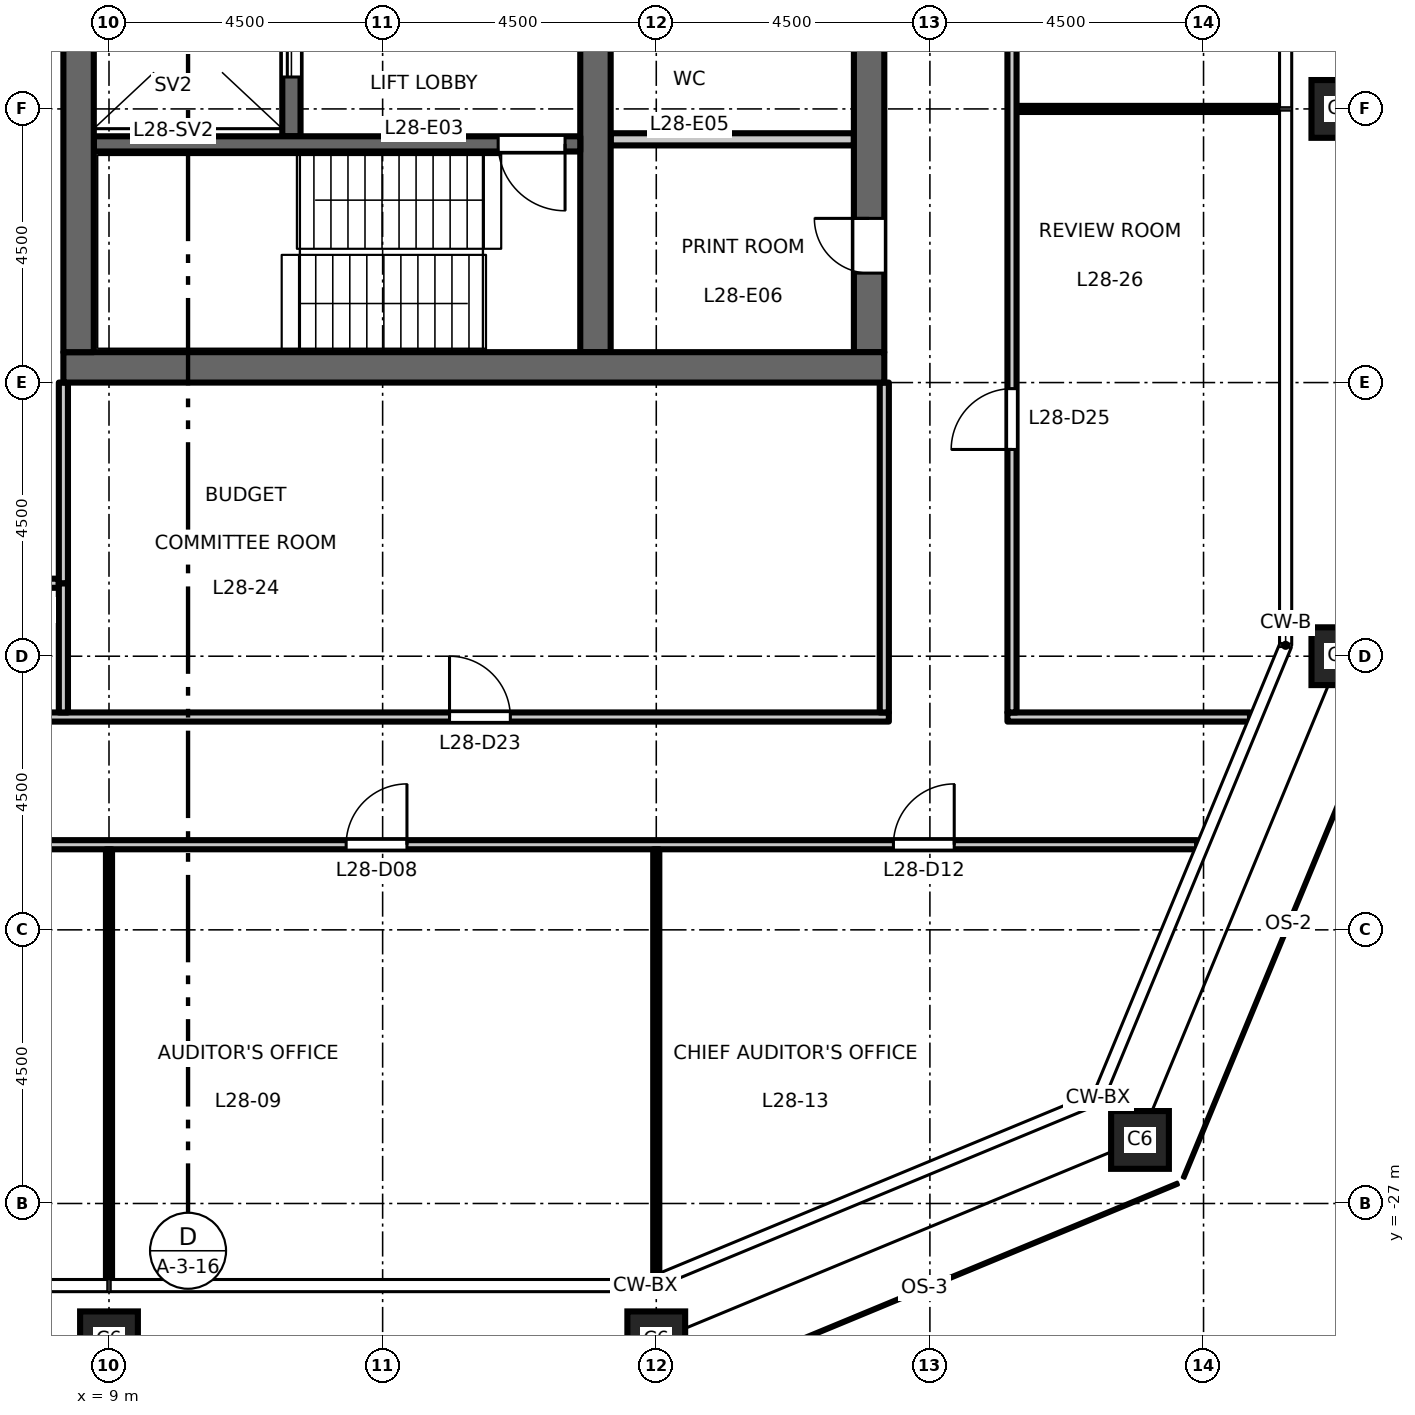
"""IFC4 building model, lengths in metres.
Left out: names, types, materials, properties, quantities, classifications, styles, units other than length and angle.
Written with IfcOpenShell. Run it as: python <this file> out.ifc"""

import sys

from ifc_helpers import new_model, si_unit, direction, frame, frame_2d, origin, origin_2d, place, context, subcontext, project, spatial, rectangle, hollow_rectangle, extrude, element, fill, save


model = new_model("IFC4")
c1 = context("Model", 3, precision=1e-05, world=origin(), true_north=direction((0.0, 1.0)))
c2 = subcontext(c1, "Body", "Model", "MODEL_VIEW")
j1 = project(units=[si_unit("LENGTHUNIT", "METRE"), si_unit("PLANEANGLEUNIT", "RADIAN")], contexts=[c1])
p1 = place(None, origin())
s1 = spatial("IfcSite", under=j1, at=p1, CompositionType="ELEMENT")
p2 = place(p1, origin())
s2 = spatial("IfcBuilding", under=s1, at=p2, CompositionType="ELEMENT")
p3 = place(p2, frame((0.0, 0.0, 131.7)))
s3 = spatial("IfcBuildingStorey", under=s2, at=p3, CompositionType="ELEMENT", Elevation=131.7)
for number, where, z_axis, x_axis in (
    (1, (9.0, -29.25, 0.0), (0.0, 0.0, 1.0), (1.0, 0.0, 0.0)),
    (2, (18.0, -29.25, 0.0), (0.0, 0.0, 1.0), (1.0, 0.0, 0.0)),
    (3, (25.955, -25.955, 0.0), (0.0, 0.0, 1.0), (1.0, 0.0, 0.0)),
    (4, (29.25, -18.0, 0.0), (0.0, 0.0, 1.0), (1.0, 0.0, 0.0)),
    (5, (29.25, -9.0, 0.0), (0.0, 0.0, 1.0), (1.0, 0.0, 0.0)),
):
    element("IfcColumn", number, at=place(p3, frame(where, z_axis=z_axis, x_axis=x_axis)), inside=s3, PredefinedType="COLUMN", context=c2, shape_type="SweptSolid", body=[
        extrude(hollow_rectangle(XDim=0.95, YDim=0.95, WallThickness=0.055, at=origin_2d()), origin(), (0.0, 0.0, 1.0), 4.5),
    ])
p4 = place(p3, frame((12.0, -9.45, 0.0), z_axis=(0.0, 0.0, 1.0), x_axis=(0.0, 1.0, 0.0)))
e6 = element("IfcWall", 6, at=p4, inside=s3, PredefinedType="SHEAR", context=c2, shape_type="SweptSolid", body=[
    extrude(rectangle(XDim=18.9, YDim=0.3, at=frame_2d((9.45, 0.0))), origin(), (0.0, 0.0, 1.0), 4.35),
])
p5 = place(p4, frame((3.625, 0.0, 0.0)))
e7 = element("IfcOpeningElement", 7, at=p5, cuts=e6, PredefinedType="OPENING", context=c2, shape_type="SweptSolid", body=[
    extrude(rectangle(XDim=1.1, YDim=2.1, at=frame_2d((0.55, 1.05))), frame((0.0, 0.16, 0.0), z_axis=(0.0, -1.0, 0.0), x_axis=(1.0, 0.0, 0.0)), (0.0, 0.0, 1.0), 0.32),
])
p6 = place(p4, frame((6.775, 0.0, 0.0)))
e8 = element("IfcOpeningElement", 8, at=p6, cuts=e6, PredefinedType="OPENING", context=c2, shape_type="SweptSolid", body=[
    extrude(rectangle(XDim=1.1, YDim=2.1, at=frame_2d((0.55, 1.05))), frame((0.0, 0.16, 0.0), z_axis=(0.0, -1.0, 0.0), x_axis=(1.0, 0.0, 0.0)), (0.0, 0.0, 1.0), 0.32),
])
p7 = place(p4, frame((9.925, 0.0, 0.0)))
e9 = element("IfcOpeningElement", 9, at=p7, cuts=e6, PredefinedType="OPENING", context=c2, shape_type="SweptSolid", body=[
    extrude(rectangle(XDim=1.1, YDim=2.1, at=frame_2d((0.55, 1.05))), frame((0.0, 0.16, 0.0), z_axis=(0.0, -1.0, 0.0), x_axis=(1.0, 0.0, 0.0)), (0.0, 0.0, 1.0), 0.32),
])
p8 = place(p4, frame((13.075, 0.0, 0.0)))
e10 = element("IfcOpeningElement", 10, at=p8, cuts=e6, PredefinedType="OPENING", context=c2, shape_type="SweptSolid", body=[
    extrude(rectangle(XDim=1.1, YDim=2.1, at=frame_2d((0.55, 1.05))), frame((0.0, 0.16, 0.0), z_axis=(0.0, -1.0, 0.0), x_axis=(1.0, 0.0, 0.0)), (0.0, 0.0, 1.0), 0.32),
])
p9 = place(p4, frame((16.725, 0.0, 0.0)))
e11 = element("IfcOpeningElement", 11, at=p9, cuts=e6, PredefinedType="OPENING", context=c2, shape_type="SweptSolid", body=[
    extrude(rectangle(XDim=1.2, YDim=2.1, at=frame_2d((0.6, 1.05))), frame((0.0, 0.16, 0.0), z_axis=(0.0, -1.0, 0.0), x_axis=(1.0, 0.0, 0.0)), (0.0, 0.0, 1.0), 0.32),
])
p10 = place(p4, frame((0.975, 0.0, 0.0)))
e12 = element("IfcOpeningElement", 12, at=p10, cuts=e6, PredefinedType="OPENING", context=c2, shape_type="SweptSolid", body=[
    extrude(rectangle(XDim=1.2, YDim=2.1, at=frame_2d((0.6, 1.05))), frame((0.0, 0.16, 0.0), z_axis=(0.0, -1.0, 0.0), x_axis=(1.0, 0.0, 0.0)), (0.0, 0.0, 1.0), 0.32),
])
p11 = place(p3, frame((21.5, -13.0, 0.0), z_axis=(0.0, 0.0, 1.0), x_axis=(0.0, 1.0, 0.0)))
e13 = element("IfcWall", 13, at=p11, inside=s3, PredefinedType="SHEAR", context=c2, shape_type="SweptSolid", body=[
    extrude(rectangle(XDim=26.0, YDim=0.5, at=frame_2d((13.0, 0.0))), origin(), (0.0, 0.0, 1.0), 4.35),
])
p12 = place(p11, frame((16.825, 0.0, 0.0)))
e14 = element("IfcOpeningElement", 14, at=p12, cuts=e13, PredefinedType="OPENING", context=c2, shape_type="SweptSolid", body=[
    extrude(rectangle(XDim=1.8, YDim=2.1, at=frame_2d((0.9, 1.05))), frame((0.0, 0.26, 0.0), z_axis=(0.0, -1.0, 0.0), x_axis=(1.0, 0.0, 0.0)), (0.0, 0.0, 1.0), 0.52),
])
p13 = place(p11, frame((7.375, 0.0, 0.0)))
e15 = element("IfcOpeningElement", 15, at=p13, cuts=e13, PredefinedType="OPENING", context=c2, shape_type="SweptSolid", body=[
    extrude(rectangle(XDim=1.8, YDim=2.1, at=frame_2d((0.9, 1.05))), frame((0.0, 0.26, 0.0), z_axis=(0.0, -1.0, 0.0), x_axis=(1.0, 0.0, 0.0)), (0.0, 0.0, 1.0), 0.52),
])
p14 = place(p11, frame((1.3, 0.0, 0.0)))
e16 = element("IfcOpeningElement", 16, at=p14, cuts=e13, PredefinedType="OPENING", context=c2, shape_type="SweptSolid", body=[
    extrude(rectangle(XDim=0.9, YDim=2.1, at=frame_2d((0.45, 1.05))), frame((0.0, 0.26, 0.0), z_axis=(0.0, -1.0, 0.0), x_axis=(1.0, 0.0, 0.0)), (0.0, 0.0, 1.0), 0.52),
])
p15 = place(p3, frame((17.25, -9.5, 0.0), z_axis=(0.0, 0.0, 1.0), x_axis=(1.0, 0.0, 0.0)))
e17 = element("IfcWall", 17, at=p15, inside=s3, PredefinedType="PARTITIONING", context=c2, shape_type="SweptSolid", body=[
    extrude(rectangle(XDim=4.0, YDim=0.2, at=frame_2d((2.0, 0.0))), origin(), (0.0, 0.0, 1.0), 4.35),
])
p16 = place(p3, frame((17.0, -13.0, 0.0), z_axis=(0.0, 0.0, 1.0), x_axis=(0.0, 1.0, 0.0)))
e18 = element("IfcWall", 18, at=p16, inside=s3, PredefinedType="SHEAR", context=c2, shape_type="SweptSolid", body=[
    extrude(rectangle(XDim=6.575, YDim=0.5, at=frame_2d((3.288, 0.0))), origin(), (0.0, 0.0, 1.0), 4.35),
])
p17 = place(p3, frame((8.75, -9.575, 0.0), z_axis=(0.0, 0.0, 1.0), x_axis=(1.0, 0.0, 0.0)))
e19 = element("IfcWall", 19, at=p17, inside=s3, PredefinedType="SHEAR", context=c2, shape_type="SweptSolid", body=[
    extrude(rectangle(XDim=8.0, YDim=0.25, at=frame_2d((4.0, 0.0))), origin(), (0.0, 0.0, 1.0), 4.35),
])
p18 = place(p17, frame((6.65, 0.0, 0.0)))
e20 = element("IfcOpeningElement", 20, at=p18, cuts=e19, PredefinedType="OPENING", context=c2, shape_type="SweptSolid", body=[
    extrude(rectangle(XDim=1.1, YDim=2.1, at=frame_2d((0.55, 1.05))), frame((0.0, 0.135, 0.0), z_axis=(0.0, -1.0, 0.0), x_axis=(1.0, 0.0, 0.0)), (0.0, 0.0, 1.0), 0.27),
])
p19 = place(p3, frame((8.25, -13.25, 0.0), z_axis=(0.0, 0.0, 1.0), x_axis=(1.0, 0.0, 0.0)))
e21 = element("IfcWall", 21, at=p19, inside=s3, PredefinedType="SHEAR", context=c2, shape_type="SweptSolid", body=[
    extrude(rectangle(XDim=13.5, YDim=0.5, at=frame_2d((6.75, 0.0))), origin(), (0.0, 0.0, 1.0), 4.35),
])
p20 = place(p3, frame((8.5, -13.0, 0.0), z_axis=(0.0, 0.0, 1.0), x_axis=(0.0, 1.0, 0.0)))
e22 = element("IfcWall", 22, at=p20, inside=s3, PredefinedType="SHEAR", context=c2, shape_type="SweptSolid", body=[
    extrude(rectangle(XDim=26.0, YDim=0.5, at=frame_2d((13.0, 0.0))), origin(), (0.0, 0.0, 1.0), 4.35),
])
p21 = place(p3, frame((-26.894, -21.1, 0.0), z_axis=(0.0, 0.0, 1.0), x_axis=(1.0, 0.0, 0.0)))
e23 = element("IfcWall", 23, at=p21, inside=s3, PredefinedType="PARTITIONING", context=c2, shape_type="SweptSolid", body=[
    extrude(rectangle(XDim=53.788, YDim=0.15, at=frame_2d((26.894, 0.0))), origin(), (0.0, 0.0, 1.0), 4.35),
])
p22 = place(p21, frame((12.794, 0.0, 0.0)))
e24 = element("IfcOpeningElement", 24, at=p22, cuts=e23, PredefinedType="OPENING", context=c2, shape_type="SweptSolid", body=[
    extrude(rectangle(XDim=1.0, YDim=2.1, at=frame_2d((0.5, 1.05))), frame((0.0, 0.085, 0.0), z_axis=(0.0, -1.0, 0.0), x_axis=(1.0, 0.0, 0.0)), (0.0, 0.0, 1.0), 0.17),
])
p23 = place(p21, frame((21.794, 0.0, 0.0)))
e25 = element("IfcOpeningElement", 25, at=p23, cuts=e23, PredefinedType="OPENING", context=c2, shape_type="SweptSolid", body=[
    extrude(rectangle(XDim=1.0, YDim=2.1, at=frame_2d((0.5, 1.05))), frame((0.0, 0.085, 0.0), z_axis=(0.0, -1.0, 0.0), x_axis=(1.0, 0.0, 0.0)), (0.0, 0.0, 1.0), 0.17),
])
p24 = place(p21, frame((30.794, 0.0, 0.0)))
e26 = element("IfcOpeningElement", 26, at=p24, cuts=e23, PredefinedType="OPENING", context=c2, shape_type="SweptSolid", body=[
    extrude(rectangle(XDim=1.0, YDim=2.1, at=frame_2d((0.5, 1.05))), frame((0.0, 0.085, 0.0), z_axis=(0.0, -1.0, 0.0), x_axis=(1.0, 0.0, 0.0)), (0.0, 0.0, 1.0), 0.17),
])
p25 = place(p21, frame((39.794, 0.0, 0.0)))
e27 = element("IfcOpeningElement", 27, at=p25, cuts=e23, PredefinedType="OPENING", context=c2, shape_type="SweptSolid", body=[
    extrude(rectangle(XDim=1.0, YDim=2.1, at=frame_2d((0.5, 1.05))), frame((0.0, 0.085, 0.0), z_axis=(0.0, -1.0, 0.0), x_axis=(1.0, 0.0, 0.0)), (0.0, 0.0, 1.0), 0.17),
])
p26 = place(p21, frame((3.9, 0.0, 0.0)))
e28 = element("IfcOpeningElement", 28, at=p26, cuts=e23, PredefinedType="OPENING", context=c2, shape_type="SweptSolid", body=[
    extrude(rectangle(XDim=1.0, YDim=2.1, at=frame_2d((0.5, 1.05))), frame((0.0, 0.085, 0.0), z_axis=(0.0, -1.0, 0.0), x_axis=(1.0, 0.0, 0.0)), (0.0, 0.0, 1.0), 0.17),
])
p27 = place(p21, frame((48.794, 0.0, 0.0)))
e29 = element("IfcOpeningElement", 29, at=p27, cuts=e23, PredefinedType="OPENING", context=c2, shape_type="SweptSolid", body=[
    extrude(rectangle(XDim=1.0, YDim=2.1, at=frame_2d((0.5, 1.05))), frame((0.0, 0.085, 0.0), z_axis=(0.0, -1.0, 0.0), x_axis=(1.0, 0.0, 0.0)), (0.0, 0.0, 1.0), 0.17),
])
p28 = place(p3, frame((-21.825, -19.0, 0.0), z_axis=(0.0, 0.0, 1.0), x_axis=(1.0, 0.0, 0.0)))
e30 = element("IfcWall", 30, at=p28, inside=s3, PredefinedType="PARTITIONING", context=c2, shape_type="SweptSolid", body=[
    extrude(rectangle(XDim=43.65, YDim=0.15, at=frame_2d((21.825, 0.0))), origin(), (0.0, 0.0, 1.0), 4.35),
])
p29 = place(p28, frame((21.425, 0.0, 0.0)))
e31 = element("IfcOpeningElement", 31, at=p29, cuts=e30, PredefinedType="OPENING", context=c2, shape_type="SweptSolid", body=[
    extrude(rectangle(XDim=1.0, YDim=2.1, at=frame_2d((0.5, 1.05))), frame((0.0, 0.085, 0.0), z_axis=(0.0, -1.0, 0.0), x_axis=(1.0, 0.0, 0.0)), (0.0, 0.0, 1.0), 0.17),
])
p30 = place(p28, frame((6.425, 0.0, 0.0)))
e32 = element("IfcOpeningElement", 32, at=p30, cuts=e30, PredefinedType="OPENING", context=c2, shape_type="SweptSolid", body=[
    extrude(rectangle(XDim=1.0, YDim=2.1, at=frame_2d((0.5, 1.05))), frame((0.0, 0.085, 0.0), z_axis=(0.0, -1.0, 0.0), x_axis=(1.0, 0.0, 0.0)), (0.0, 0.0, 1.0), 0.17),
])
p31 = place(p28, frame((36.425, 0.0, 0.0)))
e33 = element("IfcOpeningElement", 33, at=p31, cuts=e30, PredefinedType="OPENING", context=c2, shape_type="SweptSolid", body=[
    extrude(rectangle(XDim=1.0, YDim=2.1, at=frame_2d((0.5, 1.05))), frame((0.0, 0.085, 0.0), z_axis=(0.0, -1.0, 0.0), x_axis=(1.0, 0.0, 0.0)), (0.0, 0.0, 1.0), 0.17),
])
p32 = place(p3, frame((23.775, -19.0, 0.0), z_axis=(0.0, 0.0, 1.0), x_axis=(1.0, 0.0, 0.0)))
e34 = element("IfcWall", 34, at=p32, inside=s3, PredefinedType="PARTITIONING", context=c2, shape_type="SweptSolid", body=[
    extrude(rectangle(XDim=3.989, YDim=0.15, at=frame_2d((1.995, 0.0))), origin(), (0.0, 0.0, 1.0), 4.35),
])
p33 = place(p3, frame((6.66, -16.8, 0.0), z_axis=(0.0, 0.0, 1.0), x_axis=(1.0, 0.0, 0.0)))
e35 = element("IfcWall", 35, at=p33, inside=s3, PredefinedType="PARTITIONING", context=c2, shape_type="SweptSolid", body=[
    extrude(rectangle(XDim=1.515, YDim=0.15, at=frame_2d((0.758, 0.0))), origin(), (0.0, 0.0, 1.0), 4.35),
])
p34 = place(p33, frame((0.29, 0.0, 0.0)))
e36 = element("IfcOpeningElement", 36, at=p34, cuts=e35, PredefinedType="OPENING", context=c2, shape_type="SweptSolid", body=[
    extrude(rectangle(XDim=0.9, YDim=2.1, at=frame_2d((0.45, 1.05))), frame((0.0, 0.085, 0.0), z_axis=(0.0, -1.0, 0.0), x_axis=(1.0, 0.0, 0.0)), (0.0, 0.0, 1.0), 0.17),
])
p35 = place(p3, frame((23.925, -9.0, 0.0), z_axis=(0.0, 0.0, 1.0), x_axis=(1.0, 0.0, 0.0)))
e37 = element("IfcWall", 37, at=p35, inside=s3, PredefinedType="PARTITIONING", context=c2, shape_type="SweptSolid", body=[
    extrude(rectangle(XDim=4.335, YDim=0.1, at=frame_2d((2.167, 0.0))), origin(), (0.0, 0.0, 1.0), 4.35),
])
p36 = place(p3, frame((8.25, -18.925, 0.0), z_axis=(0.0, 0.0, 1.0), x_axis=(0.0, 1.0, 0.0)))
e38 = element("IfcWall", 38, at=p36, inside=s3, PredefinedType="PARTITIONING", context=c2, shape_type="SweptSolid", body=[
    extrude(rectangle(XDim=2.125, YDim=0.15, at=frame_2d((1.062, 0.0))), origin(), (0.0, 0.0, 1.0), 4.35),
])
p37 = place(p3, frame((8.25, -16.8, 0.0), z_axis=(0.0, 0.0, 1.0), x_axis=(0.0, 1.0, 0.0)))
e39 = element("IfcWall", 39, at=p37, inside=s3, PredefinedType="PARTITIONING", context=c2, shape_type="SweptSolid", body=[
    extrude(rectangle(XDim=3.3, YDim=0.15, at=frame_2d((1.65, 0.0))), origin(), (0.0, 0.0, 1.0), 4.35),
])
p38 = place(p3, frame((9.0, -28.26, 0.0), z_axis=(0.0, 0.0, 1.0), x_axis=(0.0, 1.0, 0.0)))
e40 = element("IfcWall", 40, at=p38, inside=s3, PredefinedType="PARTITIONING", context=c2, shape_type="SweptSolid", body=[
    extrude(rectangle(XDim=7.085, YDim=0.1, at=frame_2d((3.542, 0.0))), origin(), (0.0, 0.0, 1.0), 3.45),
])
p39 = place(p3, frame((18.0, -28.178, 0.0), z_axis=(0.0, 0.0, 1.0), x_axis=(0.0, 1.0, 0.0)))
e41 = element("IfcWall", 41, at=p39, inside=s3, PredefinedType="PARTITIONING", context=c2, shape_type="SweptSolid", body=[
    extrude(rectangle(XDim=7.003, YDim=0.1, at=frame_2d((3.501, 0.0))), origin(), (0.0, 0.0, 1.0), 3.45),
])
p40 = place(p3, frame((21.75, -18.925, 0.0), z_axis=(0.0, 0.0, 1.0), x_axis=(0.0, 1.0, 0.0)))
e42 = element("IfcWall", 42, at=p40, inside=s3, PredefinedType="PARTITIONING", context=c2, shape_type="SweptSolid", body=[
    extrude(rectangle(XDim=5.425, YDim=0.15, at=frame_2d((2.712, 0.0))), origin(), (0.0, 0.0, 1.0), 4.35),
])
p41 = place(p3, frame((23.85, -18.925, 0.0), z_axis=(0.0, 0.0, 1.0), x_axis=(0.0, 1.0, 0.0)))
e43 = element("IfcWall", 43, at=p41, inside=s3, PredefinedType="PARTITIONING", context=c2, shape_type="SweptSolid", body=[
    extrude(rectangle(XDim=37.85, YDim=0.15, at=frame_2d((18.925, 0.0))), origin(), (0.0, 0.0, 1.0), 4.35),
])
p42 = place(p41, frame((4.325, 0.0, 0.0)))
e44 = element("IfcOpeningElement", 44, at=p42, cuts=e43, PredefinedType="OPENING", context=c2, shape_type="SweptSolid", body=[
    extrude(rectangle(XDim=1.0, YDim=2.1, at=frame_2d((0.5, 1.05))), frame((0.0, 0.085, 0.0), z_axis=(0.0, -1.0, 0.0), x_axis=(1.0, 0.0, 0.0)), (0.0, 0.0, 1.0), 0.17),
])
p43 = place(p41, frame((13.825, 0.0, 0.0)))
e45 = element("IfcOpeningElement", 45, at=p43, cuts=e43, PredefinedType="OPENING", context=c2, shape_type="SweptSolid", body=[
    extrude(rectangle(XDim=1.0, YDim=2.1, at=frame_2d((0.5, 1.05))), frame((0.0, 0.085, 0.0), z_axis=(0.0, -1.0, 0.0), x_axis=(1.0, 0.0, 0.0)), (0.0, 0.0, 1.0), 0.17),
])
p44 = place(p41, frame((22.825, 0.0, 0.0)))
e46 = element("IfcOpeningElement", 46, at=p44, cuts=e43, PredefinedType="OPENING", context=c2, shape_type="SweptSolid", body=[
    extrude(rectangle(XDim=1.0, YDim=2.1, at=frame_2d((0.5, 1.05))), frame((0.0, 0.085, 0.0), z_axis=(0.0, -1.0, 0.0), x_axis=(1.0, 0.0, 0.0)), (0.0, 0.0, 1.0), 0.17),
])
p45 = place(p41, frame((32.325, 0.0, 0.0)))
e47 = element("IfcOpeningElement", 47, at=p45, cuts=e43, PredefinedType="OPENING", context=c2, shape_type="SweptSolid", body=[
    extrude(rectangle(XDim=1.0, YDim=2.1, at=frame_2d((0.5, 1.05))), frame((0.0, 0.085, 0.0), z_axis=(0.0, -1.0, 0.0), x_axis=(1.0, 0.0, 0.0)), (0.0, 0.0, 1.0), 0.17),
])
p46 = place(p18, origin())
e48 = element("IfcDoor", 48, at=p46, inside=s3, OperationType="SINGLE_SWING_RIGHT", PredefinedType="DOOR", context=c2, shape_type="SweptSolid", body=[
    extrude(rectangle(XDim=1.1, YDim=2.1, at=frame_2d((0.55, 1.05))), frame((0.0, 0.025, 0.0), z_axis=(0.0, -1.0, 0.0), x_axis=(1.0, 0.0, 0.0)), (0.0, 0.0, 1.0), 0.05),
])
fill(e20, e48)
p47 = place(p10, origin())
e49 = element("IfcDoor", 49, at=p47, inside=s3, OperationType="DOUBLE_DOOR_SLIDING", PredefinedType="DOOR", context=c2, shape_type="SweptSolid", body=[
    extrude(rectangle(XDim=1.2, YDim=2.1, at=frame_2d((0.6, 1.05))), frame((0.0, 0.025, 0.0), z_axis=(0.0, -1.0, 0.0), x_axis=(1.0, 0.0, 0.0)), (0.0, 0.0, 1.0), 0.05),
])
fill(e12, e49)
p48 = place(p14, origin())
e50 = element("IfcDoor", 50, at=p48, inside=s3, OperationType="SINGLE_SWING_LEFT", PredefinedType="DOOR", context=c2, shape_type="SweptSolid", body=[
    extrude(rectangle(XDim=0.9, YDim=2.1, at=frame_2d((0.45, 1.05))), frame((0.0, 0.025, 0.0), z_axis=(0.0, -1.0, 0.0), x_axis=(1.0, 0.0, 0.0)), (0.0, 0.0, 1.0), 0.05),
])
fill(e16, e50)
p49 = place(p25, origin())
e51 = element("IfcDoor", 51, at=p49, inside=s3, OperationType="SINGLE_SWING_RIGHT", PredefinedType="DOOR", context=c2, shape_type="SweptSolid", body=[
    extrude(rectangle(XDim=1.0, YDim=2.1, at=frame_2d((0.5, 1.05))), frame((0.0, 0.025, 0.0), z_axis=(0.0, -1.0, 0.0), x_axis=(1.0, 0.0, 0.0)), (0.0, 0.0, 1.0), 0.05),
])
fill(e27, e51)
p50 = place(p27, origin())
e52 = element("IfcDoor", 52, at=p50, inside=s3, OperationType="SINGLE_SWING_RIGHT", PredefinedType="DOOR", context=c2, shape_type="SweptSolid", body=[
    extrude(rectangle(XDim=1.0, YDim=2.1, at=frame_2d((0.5, 1.05))), frame((0.0, 0.025, 0.0), z_axis=(0.0, -1.0, 0.0), x_axis=(1.0, 0.0, 0.0)), (0.0, 0.0, 1.0), 0.05),
])
fill(e29, e52)
p51 = place(p31, origin())
e53 = element("IfcDoor", 53, at=p51, inside=s3, OperationType="SINGLE_SWING_LEFT", PredefinedType="DOOR", context=c2, shape_type="SweptSolid", body=[
    extrude(rectangle(XDim=1.0, YDim=2.1, at=frame_2d((0.5, 1.05))), frame((0.0, 0.025, 0.0), z_axis=(0.0, -1.0, 0.0), x_axis=(1.0, 0.0, 0.0)), (0.0, 0.0, 1.0), 0.05),
])
fill(e33, e53)
p52 = place(p42, origin())
e54 = element("IfcDoor", 54, at=p52, inside=s3, OperationType="SINGLE_SWING_LEFT", PredefinedType="DOOR", context=c2, shape_type="SweptSolid", body=[
    extrude(rectangle(XDim=1.0, YDim=2.1, at=frame_2d((0.5, 1.05))), frame((0.0, 0.025, 0.0), z_axis=(0.0, -1.0, 0.0), x_axis=(1.0, 0.0, 0.0)), (0.0, 0.0, 1.0), 0.05),
])
fill(e44, e54)
save(model, sys.argv[1])
